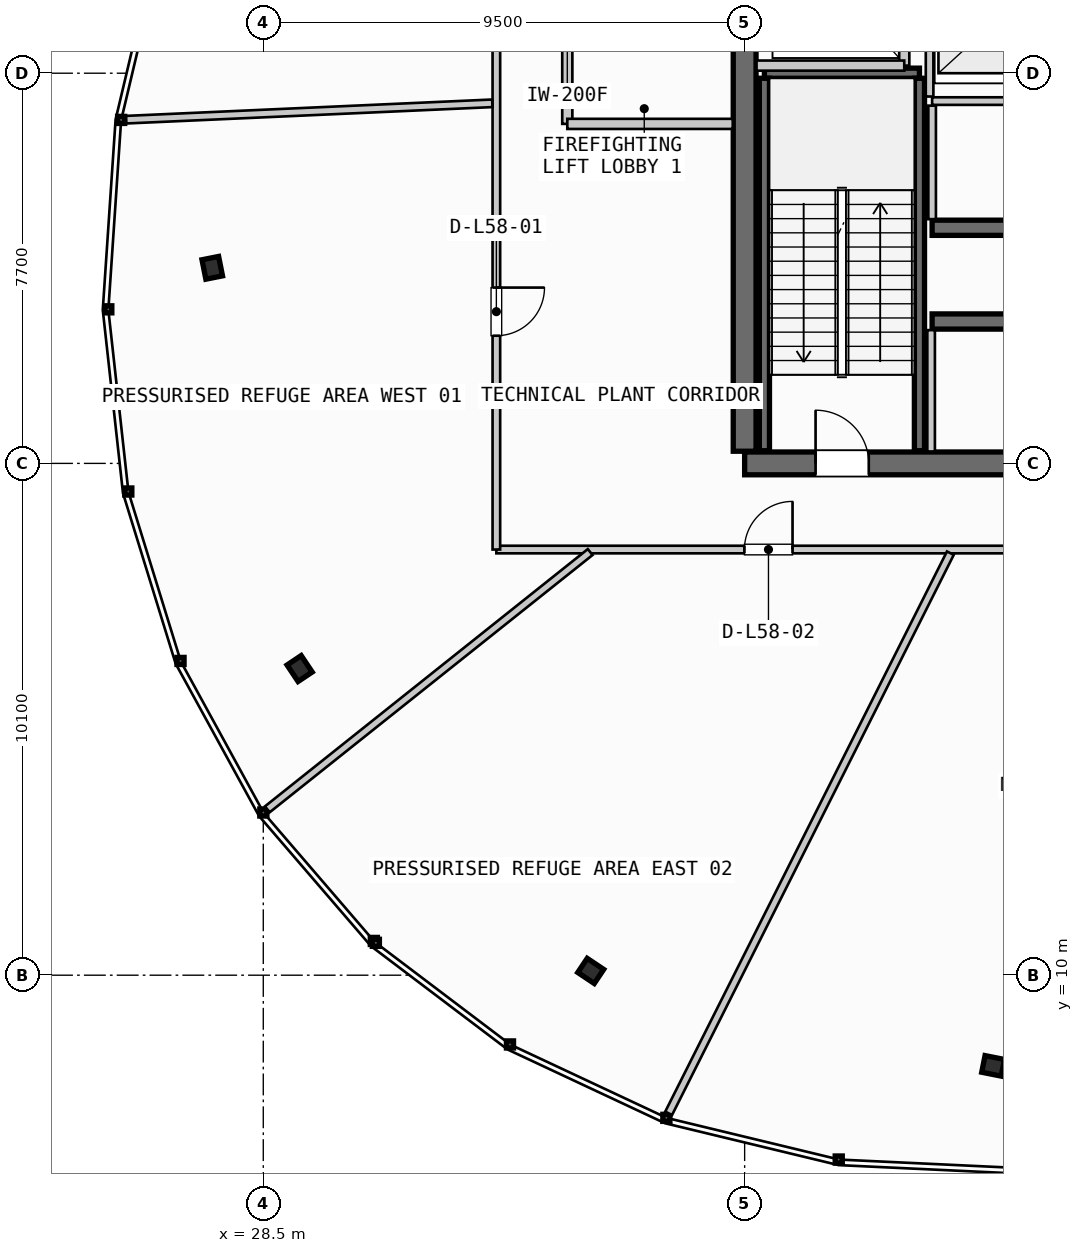
"""IFC4 building model, lengths in metres.
Left out: names, types, materials, properties, quantities, classifications, styles, units other than length and angle.
Written with IfcOpenShell. Run it as: python <this file> out.ifc"""

import sys

from ifc_helpers import new_model, si_unit, direction, frame, frame_2d, origin, origin_2d, place, context, subcontext, project, spatial, rectangle, i_section, extrude, source, transform, mapped, element, fill, save


model = new_model("IFC4")
c1 = context("Model", 3, precision=1e-05, world=origin(), true_north=direction((0.0, 1.0)))
c2 = subcontext(c1, "Body", "Model", "MODEL_VIEW")
j1 = project(units=[si_unit("LENGTHUNIT", "METRE"), si_unit("PLANEANGLEUNIT", "RADIAN")], contexts=[c1])
p1 = place(None, origin())
s1 = spatial("IfcSite", under=j1, at=p1, CompositionType="ELEMENT")
p2 = place(p1, origin())
s2 = spatial("IfcBuilding", under=s1, at=p2, CompositionType="ELEMENT")
p3 = place(p2, frame((0.0, 0.0, 223.6)))
s3 = spatial("IfcBuildingStorey", under=s2, at=p3, CompositionType="ELEMENT", Elevation=223.6)
p4 = place(p3, frame((38.0, 20.1, 0.0), z_axis=(0.0, 0.0, 1.0), x_axis=(1.0, 0.0, 0.0)))
e1 = element("IfcWall", 1, at=p4, inside=s3, PredefinedType="SHEAR", context=c2, shape_type="SweptSolid", body=[
    extrude(rectangle(XDim=17.6, YDim=0.45, at=frame_2d((8.8, 0.0))), origin(), (0.0, 0.0, 1.0), 4.38),
])
p5 = place(p4, frame((1.4, 0.0, 0.0)))
e2 = element("IfcOpeningElement", 2, at=p5, cuts=e1, PredefinedType="OPENING", context=c2, shape_type="SweptSolid", body=[
    extrude(rectangle(XDim=1.05, YDim=2.15, at=frame_2d((0.525, 1.075))), frame((0.0, 0.235, 0.0), z_axis=(0.0, -1.0, 0.0), x_axis=(1.0, 0.0, 0.0)), (0.0, 0.0, 1.0), 0.47),
])
p6 = place(p4, frame((15.15, 0.0, 0.0)))
e3 = element("IfcOpeningElement", 3, at=p6, cuts=e1, PredefinedType="OPENING", context=c2, shape_type="SweptSolid", body=[
    extrude(rectangle(XDim=1.05, YDim=2.15, at=frame_2d((0.525, 1.075))), frame((0.0, 0.235, 0.0), z_axis=(0.0, -1.0, 0.0), x_axis=(1.0, 0.0, 0.0)), (0.0, 0.0, 1.0), 0.47),
])
p7 = place(p4, frame((5.25, 0.0, 0.0)))
e4 = element("IfcOpeningElement", 4, at=p7, cuts=e1, PredefinedType="OPENING", context=c2, shape_type="SweptSolid", body=[
    extrude(rectangle(XDim=0.95, YDim=2.15, at=frame_2d((0.475, 1.075))), frame((0.0, 0.235, 0.0), z_axis=(0.0, -1.0, 0.0), x_axis=(1.0, 0.0, 0.0)), (0.0, 0.0, 1.0), 0.47),
])
p8 = place(p4, frame((11.4, 0.0, 0.0)))
e5 = element("IfcOpeningElement", 5, at=p8, cuts=e1, PredefinedType="OPENING", context=c2, shape_type="SweptSolid", body=[
    extrude(rectangle(XDim=0.95, YDim=2.15, at=frame_2d((0.475, 1.075))), frame((0.0, 0.235, 0.0), z_axis=(0.0, -1.0, 0.0), x_axis=(1.0, 0.0, 0.0)), (0.0, 0.0, 1.0), 0.47),
])
p9 = place(p3, frame((38.0, 35.26, 0.0), z_axis=(0.0, 0.0, 1.0), x_axis=(0.0, -1.0, 0.0)))
e6 = element("IfcWall", 6, at=p9, inside=s3, PredefinedType="SHEAR", context=c2, shape_type="SweptSolid", body=[
    extrude(rectangle(XDim=14.92, YDim=0.45, at=frame_2d((7.46, 0.0))), origin(), (0.0, 0.0, 1.0), 4.38),
])
p10 = place(p9, frame((5.21, 0.0, 0.0)))
e7 = element("IfcOpeningElement", 7, at=p10, cuts=e6, PredefinedType="OPENING", context=c2, shape_type="SweptSolid", body=[
    extrude(rectangle(XDim=1.1, YDim=2.2, at=frame_2d((0.55, 1.1))), frame((0.0, 0.235, 0.0), z_axis=(0.0, -1.0, 0.0), x_axis=(1.0, 0.0, 0.0)), (0.0, 0.0, 1.0), 0.47),
])
p11 = place(p3, frame((41.7, 22.9, 0.0), z_axis=(0.0, 0.0, 1.0), x_axis=(1.0, 0.0, 0.0)))
e8 = element("IfcWall", 8, at=p11, inside=s3, PredefinedType="SHEAR", context=c2, shape_type="SweptSolid", body=[
    extrude(rectangle(XDim=4.25, YDim=0.3, at=frame_2d((2.125, 0.0))), origin(), (0.0, 0.0, 1.0), 4.38),
])
p12 = place(p3, frame((41.7, 24.75, 0.0), z_axis=(0.0, 0.0, 1.0), x_axis=(1.0, 0.0, 0.0)))
e9 = element("IfcWall", 9, at=p12, inside=s3, PredefinedType="SHEAR", context=c2, shape_type="SweptSolid", body=[
    extrude(rectangle(XDim=4.25, YDim=0.3, at=frame_2d((2.125, 0.0))), origin(), (0.0, 0.0, 1.0), 4.38),
])
p13 = place(p12, frame((1.55, 0.0, 0.0)))
e10 = element("IfcOpeningElement", 10, at=p13, cuts=e9, PredefinedType="OPENING", context=c2, shape_type="SweptSolid", body=[
    extrude(rectangle(XDim=0.95, YDim=2.15, at=frame_2d((0.475, 1.075))), frame((0.0, 0.16, 0.0), z_axis=(0.0, -1.0, 0.0), x_axis=(1.0, 0.0, 0.0)), (0.0, 0.0, 1.0), 0.32),
])
m1 = source(origin(), c2, "Body", "SweptSolid", [
    extrude(i_section(OverallWidth=0.391, OverallDepth=0.335, WebThickness=0.023, FlangeThickness=0.034, FilletRadius=0.015, at=origin_2d()), origin(), (0.0, 0.0, 1.0), 4.38),
])
for number, where, z_axis, x_axis in (
    (11, (27.493, 23.96, 0.0), (0.0, 0.0, 1.0), (-0.981, -0.195, 0.0)),
    (12, (29.218, 16.052, 0.0), (0.0, 0.0, 1.0), (-0.831, -0.556, 0.0)),
    (13, (34.963, 10.084, 0.0), (0.0, 0.0, 1.0), (-0.556, -0.831, 0.0)),
    (14, (42.904, 8.211, 0.0), (0.0, 0.0, 1.0), (-0.195, -0.981, 0.0)),
):
    element("IfcColumn", number, at=place(p3, frame(where, z_axis=z_axis, x_axis=x_axis)), inside=s3, PredefinedType="COLUMN", context=c2, shape_type="MappedRepresentation", body=[
        mapped(m1, transform((0.0, 0.0, 0.0), scale=1.0)),
    ])
p14 = place(p3, frame((38.39, 27.8, 0.0), z_axis=(0.0, 0.0, 1.0), x_axis=(1.0, 0.0, 0.0)))
e15 = element("IfcWall", 15, at=p14, inside=s3, PredefinedType="SHEAR", context=c2, shape_type="SweptSolid", body=[
    extrude(rectangle(XDim=3.06, YDim=0.2, at=frame_2d((1.53, 0.0))), origin(), (0.0, 0.0, 1.0), 4.38),
])
for number, where, z_axis, x_axis in (
    (16, (41.45, 27.7, 0.0), (0.0, 0.0, 1.0), (0.0, -1.0, 0.0)),
    (17, (38.39, 20.35, 0.0), (0.0, 0.0, 1.0), (0.0, 1.0, 0.0)),
):
    element("IfcWall", number, at=place(p3, frame(where, z_axis=z_axis, x_axis=x_axis)), inside=s3, PredefinedType="SHEAR", context=c2, shape_type="SweptSolid", body=[
        extrude(rectangle(XDim=7.35, YDim=0.2, at=frame_2d((3.675, 0.0))), origin(), (0.0, 0.0, 1.0), 4.38),
    ])
p15 = place(p3, frame((41.15, 27.95, 0.0), z_axis=(0.0, 0.0, 1.0), x_axis=(0.0, 1.0, 0.0)))
e18 = element("IfcWall", 18, at=p15, inside=s3, PredefinedType="PARTITIONING", context=c2, shape_type="SweptSolid", body=[
    extrude(rectangle(XDim=3.1, YDim=0.2, at=frame_2d((1.55, 0.0))), origin(), (0.0, 0.0, 1.0), 2.455),
])
p16 = place(p3, frame((38.235, 27.95, 0.0), z_axis=(0.0, 0.0, 1.0), x_axis=(1.0, 0.0, 0.0)))
e19 = element("IfcWall", 19, at=p16, inside=s3, PredefinedType="PARTITIONING", context=c2, shape_type="SweptSolid", body=[
    extrude(rectangle(XDim=2.915, YDim=0.2, at=frame_2d((1.458, 0.0))), origin(), (0.0, 0.0, 1.0), 2.455),
])
p17 = place(p3, frame((34.5, 31.2, 0.0), z_axis=(0.0, 0.0, 1.0), x_axis=(0.0, -1.0, 0.0)))
e20 = element("IfcWall", 20, at=p17, inside=s3, PredefinedType="PARTITIONING", context=c2, shape_type="SweptSolid", body=[
    extrude(rectangle(XDim=4.4, YDim=0.2, at=frame_2d((2.2, 0.0))), origin(), (0.0, 0.0, 1.0), 2.455),
])
p18 = place(p17, frame((1.65, 0.0, 0.0)))
e21 = element("IfcOpeningElement", 21, at=p18, cuts=e20, PredefinedType="OPENING", context=c2, shape_type="SweptSolid", body=[
    extrude(rectangle(XDim=1.05, YDim=2.15, at=frame_2d((0.525, 1.075))), frame((0.0, 0.11, 0.0), z_axis=(0.0, -1.0, 0.0), x_axis=(1.0, 0.0, 0.0)), (0.0, 0.0, 1.0), 0.22),
])
p19 = place(p3, frame((34.5, 26.8, 0.0), z_axis=(0.0, 0.0, 1.0), x_axis=(1.0, 0.0, 0.0)))
e22 = element("IfcWall", 22, at=p19, inside=s3, PredefinedType="PARTITIONING", context=c2, shape_type="SweptSolid", body=[
    extrude(rectangle(XDim=3.265, YDim=0.2, at=frame_2d((1.632, 0.0))), origin(), (0.0, 0.0, 1.0), 2.455),
])
p20 = place(p3, frame((41.68, 20.335, 0.0), z_axis=(0.0, 0.0, 1.0), x_axis=(0.0, 1.0, 0.0)))
e23 = element("IfcWall", 23, at=p20, inside=s3, PredefinedType="PARTITIONING", context=c2, shape_type="SweptSolid", body=[
    extrude(rectangle(XDim=2.395, YDim=0.15, at=frame_2d((1.198, 0.0))), origin(), (0.0, 0.0, 1.0), 2.455),
])
p21 = place(p3, frame((41.7, 27.25, 0.0), z_axis=(0.0, 0.0, 1.0), x_axis=(1.0, 0.0, 0.0)))
e24 = element("IfcWall", 24, at=p21, inside=s3, PredefinedType="PARTITIONING", context=c2, shape_type="SweptSolid", body=[
    extrude(rectangle(XDim=4.25, YDim=0.15, at=frame_2d((2.125, 0.0))), origin(), (0.0, 0.0, 1.0), 2.455),
])
p22 = place(p3, frame((41.7, 24.92, 0.0), z_axis=(0.0, 0.0, 1.0), x_axis=(0.0, 1.0, 0.0)))
e25 = element("IfcWall", 25, at=p22, inside=s3, PredefinedType="PARTITIONING", context=c2, shape_type="SweptSolid", body=[
    extrude(rectangle(XDim=2.24, YDim=0.15, at=frame_2d((1.12, 0.0))), origin(), (0.0, 0.0, 1.0), 2.455),
])
p23 = place(p3, frame((41.65, 27.34, 0.0), z_axis=(0.0, 0.0, 1.0), x_axis=(0.0, 1.0, 0.0)))
e26 = element("IfcWall", 26, at=p23, inside=s3, PredefinedType="PARTITIONING", context=c2, shape_type="SweptSolid", body=[
    extrude(rectangle(XDim=2.34, YDim=0.15, at=frame_2d((1.17, 0.0))), origin(), (0.0, 0.0, 1.0), 2.455),
])
p24 = place(p3, frame((33.1, 18.4, 0.0), z_axis=(0.0, 0.0, 1.0), x_axis=(1.0, 0.0, 0.0)))
e27 = element("IfcWall", 27, at=p24, inside=s3, PredefinedType="PARTITIONING", context=c2, shape_type="SweptSolid", body=[
    extrude(rectangle(XDim=27.4, YDim=0.15, at=frame_2d((13.7, 0.0))), origin(), (0.0, 0.0, 1.0), 2.455),
])
p25 = place(p24, frame((4.895, 0.0, 0.0)))
e28 = element("IfcOpeningElement", 28, at=p25, cuts=e27, PredefinedType="OPENING", context=c2, shape_type="SweptSolid", body=[
    extrude(rectangle(XDim=0.95, YDim=2.15, at=frame_2d((0.475, 1.075))), frame((0.0, 0.085, 0.0), z_axis=(0.0, -1.0, 0.0), x_axis=(1.0, 0.0, 0.0)), (0.0, 0.0, 1.0), 0.17),
])
p26 = place(p24, frame((12.85, 0.0, 0.0)))
e29 = element("IfcOpeningElement", 29, at=p26, cuts=e27, PredefinedType="OPENING", context=c2, shape_type="SweptSolid", body=[
    extrude(rectangle(XDim=0.95, YDim=2.15, at=frame_2d((0.475, 1.075))), frame((0.0, 0.085, 0.0), z_axis=(0.0, -1.0, 0.0), x_axis=(1.0, 0.0, 0.0)), (0.0, 0.0, 1.0), 0.17),
])
p27 = place(p24, frame((20.276, 0.0, 0.0)))
e30 = element("IfcOpeningElement", 30, at=p27, cuts=e27, PredefinedType="OPENING", context=c2, shape_type="SweptSolid", body=[
    extrude(rectangle(XDim=0.95, YDim=2.15, at=frame_2d((0.475, 1.075))), frame((0.0, 0.085, 0.0), z_axis=(0.0, -1.0, 0.0), x_axis=(1.0, 0.0, 0.0)), (0.0, 0.0, 1.0), 0.17),
])
p28 = place(p3, frame((33.1, 37.2, 0.0), z_axis=(0.0, 0.0, 1.0), x_axis=(0.0, -1.0, 0.0)))
e31 = element("IfcWall", 31, at=p28, inside=s3, PredefinedType="PARTITIONING", context=c2, shape_type="SweptSolid", body=[
    extrude(rectangle(XDim=18.8, YDim=0.15, at=frame_2d((9.4, 0.0))), origin(), (0.0, 0.0, 1.0), 2.455),
])
p29 = place(p28, frame((13.63, 0.0, 0.0)))
e32 = element("IfcOpeningElement", 32, at=p29, cuts=e31, PredefinedType="OPENING", context=c2, shape_type="SweptSolid", body=[
    extrude(rectangle(XDim=0.95, YDim=2.15, at=frame_2d((0.475, 1.075))), frame((0.0, 0.085, 0.0), z_axis=(0.0, -1.0, 0.0), x_axis=(1.0, 0.0, 0.0)), (0.0, 0.0, 1.0), 0.17),
])
p30 = place(p28, frame((4.81, 0.0, 0.0)))
e33 = element("IfcOpeningElement", 33, at=p30, cuts=e31, PredefinedType="OPENING", context=c2, shape_type="SweptSolid", body=[
    extrude(rectangle(XDim=0.95, YDim=2.15, at=frame_2d((0.475, 1.075))), frame((0.0, 0.085, 0.0), z_axis=(0.0, -1.0, 0.0), x_axis=(1.0, 0.0, 0.0)), (0.0, 0.0, 1.0), 0.17),
])
p31 = place(p3, frame((33.02, 27.206, 0.0), z_axis=(0.0, 0.0, 1.0), x_axis=(-0.999000719798, -0.04469409181, 0.0)))
e34 = element("IfcWall", 34, at=p31, inside=s3, PredefinedType="PARTITIONING", context=c2, shape_type="SweptSolid", body=[
    extrude(rectangle(XDim=7.232, YDim=0.15, at=frame_2d((3.616, 0.0))), origin(), (0.0, 0.0, 1.0), 2.455),
])
p32 = place(p3, frame((34.952, 18.35, 0.0), z_axis=(0.0, 0.0, 1.0), x_axis=(-0.782121388548, -0.623126097653, 0.0)))
e35 = element("IfcWall", 35, at=p32, inside=s3, PredefinedType="PARTITIONING", context=c2, shape_type="SweptSolid", body=[
    extrude(rectangle(XDim=8.147, YDim=0.15, at=frame_2d((4.074, 0.0))), origin(), (0.0, 0.0, 1.0), 2.455),
])
p33 = place(p3, frame((42.06, 18.329, 0.0), z_axis=(0.0, 0.0, 1.0), x_axis=(-0.449311729851, -0.893375044098, 0.0)))
e36 = element("IfcWall", 36, at=p33, inside=s3, PredefinedType="PARTITIONING", context=c2, shape_type="SweptSolid", body=[
    extrude(rectangle(XDim=12.374, YDim=0.15, at=frame_2d((6.187, 0.0))), origin(), (0.0, 0.0, 1.0), 2.455),
])
m2 = source(origin(), c2, "Body", "SweptSolid", [
    extrude(rectangle(XDim=1.05, YDim=2.15, at=frame_2d((0.525, 1.075))), frame((0.0, 0.025, 0.0), z_axis=(0.0, -1.0, 0.0), x_axis=(1.0, 0.0, 0.0)), (0.0, 0.0, 1.0), 0.05),
])
p34 = place(p5, origin())
e37 = element("IfcDoor", 37, at=p34, inside=s3, OperationType="SINGLE_SWING_LEFT", PredefinedType="DOOR", context=c2, shape_type="MappedRepresentation", body=[
    mapped(m2, transform((0.0, 0.0, 0.0), scale=1.0)),
])
fill(e2, e37)
m3 = source(origin(), c2, "Body", "SweptSolid", [
    extrude(rectangle(XDim=0.95, YDim=2.15, at=frame_2d((0.475, 1.075))), frame((0.0, 0.025, 0.0), z_axis=(0.0, -1.0, 0.0), x_axis=(1.0, 0.0, 0.0)), (0.0, 0.0, 1.0), 0.05),
])
p35 = place(p25, origin())
e38 = element("IfcDoor", 38, at=p35, inside=s3, OperationType="SINGLE_SWING_RIGHT", PredefinedType="DOOR", context=c2, shape_type="MappedRepresentation", body=[
    mapped(m3, transform((0.0, 0.0, 0.0), scale=1.0)),
])
fill(e28, e38)
p36 = place(p29, origin())
e39 = element("IfcDoor", 39, at=p36, inside=s3, OperationType="SINGLE_SWING_LEFT", PredefinedType="DOOR", context=c2, shape_type="MappedRepresentation", body=[
    mapped(m3, transform((0.0, 0.0, 0.0), scale=1.0)),
])
fill(e32, e39)
save(model, sys.argv[1])
